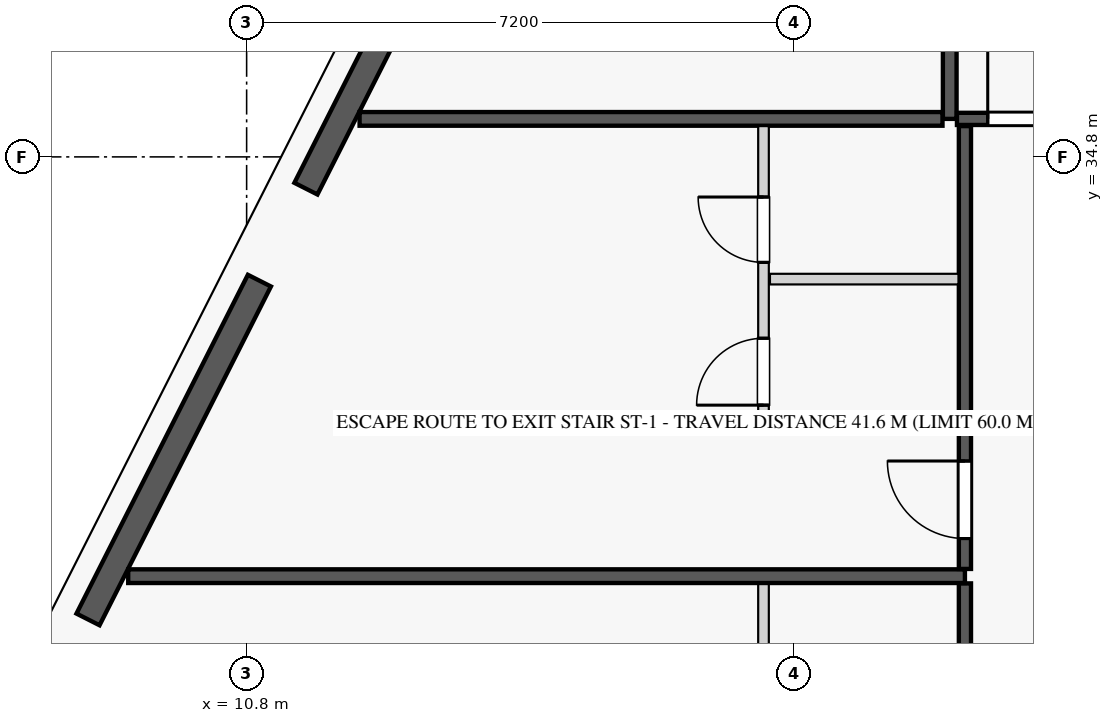
"""IFC4 building model, lengths in metres.
Left out: names, types, materials, properties, quantities, classifications, styles, units other than length and angle.
Written with IfcOpenShell. Run it as: python <this file> out.ifc"""

import sys

from ifc_helpers import new_model, si_unit, direction, frame, frame_2d, origin, origin_2d, place, context, subcontext, project, spatial, rectangle, extrude, element, fill, save


model = new_model("IFC4")
c1 = context("Model", 3, precision=1e-05, world=origin(), true_north=direction((0.0, 1.0)))
c2 = subcontext(c1, "Body", "Model", "MODEL_VIEW")
j1 = project(units=[si_unit("LENGTHUNIT", "METRE"), si_unit("PLANEANGLEUNIT", "RADIAN")], contexts=[c1])
p1 = place(None, origin())
s1 = spatial("IfcSite", under=j1, at=p1, CompositionType="ELEMENT")
p2 = place(p1, origin())
s2 = spatial("IfcBuilding", under=s1, at=p2, CompositionType="ELEMENT")
p3 = place(p2, frame((0.0, 0.0, 112.6)))
s3 = spatial("IfcBuildingStorey", under=s2, at=p3, CompositionType="ELEMENT", Elevation=112.6)
for number, where, z_axis, x_axis in (
    (1, (11.348, 33.776, 0.0), (0.0, 0.0, 1.0), (1.0, 0.0, 0.0)),
    (2, (8.443, 28.109, 0.0), (0.0, 0.0, 1.0), (1.0, 0.0, 0.0)),
):
    element("IfcColumn", number, at=place(p3, frame(where, z_axis=z_axis, x_axis=x_axis)), inside=s3, PredefinedType="COLUMN", context=c2, shape_type="SweptSolid", body=[
        extrude(rectangle(XDim=1.05, YDim=1.05, at=origin_2d()), origin(), (0.0, 0.0, 1.0), 3.55),
    ])
p4 = place(p3, frame((13.937, 39.039, 0.0), z_axis=(0.0, 0.0, 1.0), x_axis=(-0.451567731634, -0.892236842855, 0.0)))
e3 = element("IfcWall", 3, at=p4, inside=s3, PredefinedType="STANDARD", context=c2, shape_type="SweptSolid", body=[
    extrude(rectangle(XDim=5.219, YDim=0.34, at=frame_2d((2.61, 0.0))), origin(), (0.0, 0.0, 1.0), 2.797),
])
p5 = place(p4, frame((2.06, 0.0, 0.75)))
e4 = element("IfcOpeningElement", 4, at=p5, cuts=e3, PredefinedType="OPENING", context=c2, shape_type="SweptSolid", body=[
    extrude(rectangle(XDim=1.1, YDim=1.897, at=frame_2d((0.55, 0.948))), frame((0.0, 0.18, 0.0), z_axis=(0.0, -1.0, 0.0), x_axis=(1.0, 0.0, 0.0)), (0.0, 0.0, 1.0), 0.36),
])
p6 = place(p3, frame((10.968, 33.172, 0.0), z_axis=(0.0, 0.0, 1.0), x_axis=(-0.451470533039, -0.892286029139, 0.0)))
e5 = element("IfcWall", 5, at=p6, inside=s3, PredefinedType="STANDARD", context=c2, shape_type="SweptSolid", body=[
    extrude(rectangle(XDim=4.995, YDim=0.34, at=frame_2d((2.498, 0.0))), origin(), (0.0, 0.0, 1.0), 2.797),
])
p7 = place(p6, frame((1.947, 0.0, 0.75)))
e6 = element("IfcOpeningElement", 6, at=p7, cuts=e5, PredefinedType="OPENING", context=c2, shape_type="SweptSolid", body=[
    extrude(rectangle(XDim=1.1, YDim=1.897, at=frame_2d((0.55, 0.948))), frame((0.0, 0.18, 0.0), z_axis=(0.0, -1.0, 0.0), x_axis=(1.0, 0.0, 0.0)), (0.0, 0.0, 1.0), 0.36),
])
p8 = place(p3, frame((20.05, 35.3, 0.0), z_axis=(0.0, 0.0, 1.0), x_axis=(0.0, 1.0, 0.0)))
e7 = element("IfcWall", 7, at=p8, inside=s3, PredefinedType="PARTITIONING", context=c2, shape_type="SweptSolid", body=[
    extrude(rectangle(XDim=12.195, YDim=0.18, at=frame_2d((6.098, 0.0))), origin(), (0.0, 0.0, 1.0), 3.34),
])
p9 = place(p3, frame((20.145, 35.3, 0.0), z_axis=(0.0, 0.0, 1.0), x_axis=(1.0, 0.0, 0.0)))
e8 = element("IfcWall", 8, at=p9, inside=s3, PredefinedType="PARTITIONING", context=c2, shape_type="SweptSolid", body=[
    extrude(rectangle(XDim=24.51, YDim=0.16, at=frame_2d((12.255, 0.0))), origin(), (0.0, 0.0, 1.0), 3.34),
])
p10 = place(p9, frame((0.405, 0.0, 0.0)))
e9 = element("IfcOpeningElement", 9, at=p10, cuts=e8, PredefinedType="OPENING", context=c2, shape_type="SweptSolid", body=[
    extrude(rectangle(XDim=1.35, YDim=2.35, at=frame_2d((0.675, 1.175))), frame((0.0, 0.09, 0.0), z_axis=(0.0, -1.0, 0.0), x_axis=(1.0, 0.0, 0.0)), (0.0, 0.0, 1.0), 0.18),
])
p11 = place(p3, frame((12.286, 35.3, 0.0), z_axis=(0.0, 0.0, 1.0), x_axis=(1.0, 0.0, 0.0)))
e10 = element("IfcWall", 10, at=p11, inside=s3, PredefinedType="PARTITIONING", context=c2, shape_type="SweptSolid", body=[
    extrude(rectangle(XDim=7.669, YDim=0.18, at=frame_2d((3.834, 0.0))), origin(), (0.0, 0.0, 1.0), 3.34),
])
p12 = place(p3, frame((20.25, 23.175, 0.0), z_axis=(0.0, 0.0, 1.0), x_axis=(0.0, 1.0, 0.0)))
e11 = element("IfcWall", 11, at=p12, inside=s3, PredefinedType="PARTITIONING", context=c2, shape_type="SweptSolid", body=[
    extrude(rectangle(XDim=6.014, YDim=0.16, at=frame_2d((3.007, 0.0))), origin(), (0.0, 0.0, 1.0), 3.34),
])
p13 = place(p12, frame((0.4, 0.0, 0.0)))
e12 = element("IfcOpeningElement", 12, at=p13, cuts=e11, PredefinedType="OPENING", context=c2, shape_type="SweptSolid", body=[
    extrude(rectangle(XDim=1.02, YDim=2.25, at=frame_2d((0.51, 1.125))), frame((0.0, 0.09, 0.0), z_axis=(0.0, -1.0, 0.0), x_axis=(1.0, 0.0, 0.0)), (0.0, 0.0, 1.0), 0.18),
])
p14 = place(p3, frame((17.6, 25.13, 0.0), z_axis=(0.0, 0.0, 1.0), x_axis=(0.0, 1.0, 0.0)))
e13 = element("IfcWall", 13, at=p14, inside=s3, PredefinedType="PLUMBINGWALL", context=c2, shape_type="SweptSolid", body=[
    extrude(rectangle(XDim=4.059, YDim=0.14, at=frame_2d((2.03, 0.0))), origin(), (0.0, 0.0, 1.0), 3.34),
])
p15 = place(p14, frame((2.168, 0.0, 0.0)))
e14 = element("IfcOpeningElement", 14, at=p15, cuts=e13, PredefinedType="OPENING", context=c2, shape_type="SweptSolid", body=[
    extrude(rectangle(XDim=0.86, YDim=2.1, at=frame_2d((0.43, 1.05))), frame((0.0, 0.08, 0.0), z_axis=(0.0, -1.0, 0.0), x_axis=(1.0, 0.0, 0.0)), (0.0, 0.0, 1.0), 0.16),
])
p16 = place(p14, frame((0.2, 0.0, 0.0)))
e15 = element("IfcOpeningElement", 15, at=p16, cuts=e13, PredefinedType="OPENING", context=c2, shape_type="SweptSolid", body=[
    extrude(rectangle(XDim=0.88, YDim=2.15, at=frame_2d((0.44, 1.075))), frame((0.0, 0.08, 0.0), z_axis=(0.0, -1.0, 0.0), x_axis=(1.0, 0.0, 0.0)), (0.0, 0.0, 1.0), 0.16),
])
p17 = place(p3, frame((9.242, 29.284, 0.0), z_axis=(0.0, 0.0, 1.0), x_axis=(1.0, 0.0, 0.0)))
e16 = element("IfcWall", 16, at=p17, inside=s3, PredefinedType="PARTITIONING", context=c2, shape_type="SweptSolid", body=[
    extrude(rectangle(XDim=11.008, YDim=0.18, at=frame_2d((5.504, 0.0))), origin(), (0.0, 0.0, 1.0), 3.34),
])
p18 = place(p3, frame((20.25, 29.379, 0.0), z_axis=(0.0, 0.0, 1.0), x_axis=(0.0, 1.0, 0.0)))
e17 = element("IfcWall", 17, at=p18, inside=s3, PredefinedType="PARTITIONING", context=c2, shape_type="SweptSolid", body=[
    extrude(rectangle(XDim=5.826, YDim=0.16, at=frame_2d((2.913, 0.0))), origin(), (0.0, 0.0, 1.0), 3.34),
])
p19 = place(p18, frame((0.4, 0.0, 0.0)))
e18 = element("IfcOpeningElement", 18, at=p19, cuts=e17, PredefinedType="OPENING", context=c2, shape_type="SweptSolid", body=[
    extrude(rectangle(XDim=1.02, YDim=2.25, at=frame_2d((0.51, 1.125))), frame((0.0, 0.09, 0.0), z_axis=(0.0, -1.0, 0.0), x_axis=(1.0, 0.0, 0.0)), (0.0, 0.0, 1.0), 0.18),
])
p20 = place(p3, frame((17.685, 31.334, 0.0), z_axis=(0.0, 0.0, 1.0), x_axis=(1.0, 0.0, 0.0)))
e19 = element("IfcWall", 19, at=p20, inside=s3, PredefinedType="PARTITIONING", context=c2, shape_type="SweptSolid", body=[
    extrude(rectangle(XDim=2.48, YDim=0.125, at=frame_2d((1.24, 0.0))), origin(), (0.0, 0.0, 1.0), 3.34),
])
p21 = place(p3, frame((17.6, 31.334, 0.0), z_axis=(0.0, 0.0, 1.0), x_axis=(0.0, 1.0, 0.0)))
e20 = element("IfcWall", 20, at=p21, inside=s3, PredefinedType="PLUMBINGWALL", context=c2, shape_type="SweptSolid", body=[
    extrude(rectangle(XDim=3.871, YDim=0.14, at=frame_2d((1.936, 0.0))), origin(), (0.0, 0.0, 1.0), 3.34),
])
p22 = place(p21, frame((2.078, 0.0, 0.0)))
e21 = element("IfcOpeningElement", 21, at=p22, cuts=e20, PredefinedType="OPENING", context=c2, shape_type="SweptSolid", body=[
    extrude(rectangle(XDim=0.86, YDim=2.1, at=frame_2d((0.43, 1.05))), frame((0.0, 0.08, 0.0), z_axis=(0.0, -1.0, 0.0), x_axis=(1.0, 0.0, 0.0)), (0.0, 0.0, 1.0), 0.16),
])
p23 = place(p21, frame((0.2, 0.0, 0.0)))
e22 = element("IfcOpeningElement", 22, at=p23, cuts=e20, PredefinedType="OPENING", context=c2, shape_type="SweptSolid", body=[
    extrude(rectangle(XDim=0.88, YDim=2.15, at=frame_2d((0.44, 1.075))), frame((0.0, 0.08, 0.0), z_axis=(0.0, -1.0, 0.0), x_axis=(1.0, 0.0, 0.0)), (0.0, 0.0, 1.0), 0.16),
])
p24 = place(p3, frame((17.685, 33.192, 0.0), z_axis=(0.0, 0.0, 1.0), x_axis=(1.0, 0.0, 0.0)))
e23 = element("IfcWall", 23, at=p24, inside=s3, PredefinedType="PLUMBINGWALL", context=c2, shape_type="SweptSolid", body=[
    extrude(rectangle(XDim=2.48, YDim=0.14, at=frame_2d((1.24, 0.0))), origin(), (0.0, 0.0, 1.0), 2.722),
])
p25 = place(p7, origin())
e24 = element("IfcWindow", 24, at=p25, inside=s3, PartitioningType="SINGLE_PANEL", PredefinedType="WINDOW", context=c2, shape_type="SweptSolid", body=[
    extrude(rectangle(XDim=1.1, YDim=1.897, at=frame_2d((0.55, 0.948))), frame((0.0, 0.03, 0.0), z_axis=(0.0, -1.0, 0.0), x_axis=(1.0, 0.0, 0.0)), (0.0, 0.0, 1.0), 0.06),
])
fill(e6, e24)
p26 = place(p10, origin())
e25 = element("IfcDoor", 25, at=p26, inside=s3, OperationType="SINGLE_SWING_LEFT", PredefinedType="DOOR", context=c2, shape_type="SweptSolid", body=[
    extrude(rectangle(XDim=1.35, YDim=2.35, at=frame_2d((0.675, 1.175))), frame((0.0, 0.025, 0.0), z_axis=(0.0, -1.0, 0.0), x_axis=(1.0, 0.0, 0.0)), (0.0, 0.0, 1.0), 0.05),
])
fill(e9, e25)
p27 = place(p22, origin())
e26 = element("IfcDoor", 26, at=p27, inside=s3, OperationType="SINGLE_SWING_RIGHT", PredefinedType="DOOR", context=c2, shape_type="SweptSolid", body=[
    extrude(rectangle(XDim=0.86, YDim=2.1, at=frame_2d((0.43, 1.05))), frame((0.0, 0.025, 0.0), z_axis=(0.0, -1.0, 0.0), x_axis=(1.0, 0.0, 0.0)), (0.0, 0.0, 1.0), 0.05),
])
fill(e21, e26)
p28 = place(p19, origin())
e27 = element("IfcDoor", 27, at=p28, inside=s3, OperationType="SINGLE_SWING_RIGHT", PredefinedType="DOOR", context=c2, shape_type="SweptSolid", body=[
    extrude(rectangle(XDim=1.02, YDim=2.25, at=frame_2d((0.51, 1.125))), frame((0.0, 0.025, 0.0), z_axis=(0.0, -1.0, 0.0), x_axis=(1.0, 0.0, 0.0)), (0.0, 0.0, 1.0), 0.05),
])
fill(e18, e27)
p29 = place(p23, origin())
e28 = element("IfcDoor", 28, at=p29, inside=s3, OperationType="SINGLE_SWING_LEFT", PredefinedType="DOOR", context=c2, shape_type="SweptSolid", body=[
    extrude(rectangle(XDim=0.88, YDim=2.15, at=frame_2d((0.44, 1.075))), frame((0.0, 0.025, 0.0), z_axis=(0.0, -1.0, 0.0), x_axis=(1.0, 0.0, 0.0)), (0.0, 0.0, 1.0), 0.05),
])
fill(e22, e28)
save(model, sys.argv[1])
